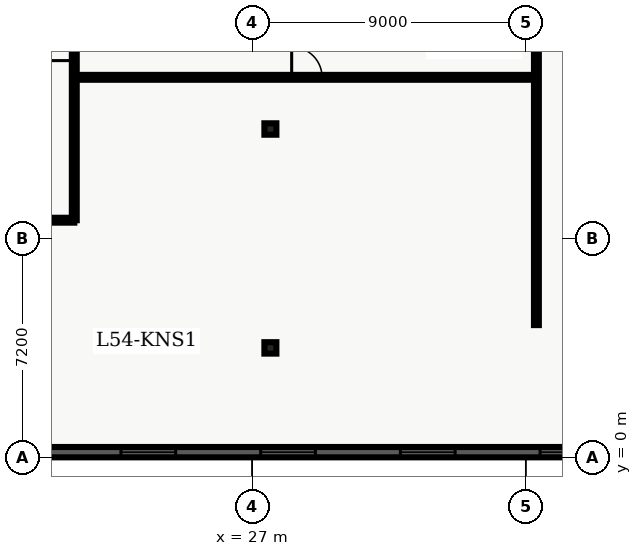
"""IFC4 building model, lengths in metres.
Left out: names, types, materials, properties, quantities, classifications, styles, units other than length and angle.
Written with IfcOpenShell. Run it as: python <this file> out.ifc"""

import sys

from ifc_helpers import new_model, entity, si_unit, converted_unit, direction, frame, origin_with_axes, origin_2d_with_axis, place, context, subcontext, project, spatial, polyline, rectangle, i_section, outline, extrude, element, fill, save


model = new_model("IFC4")
c1 = context("Model", 3, precision=1e-05, world=origin_with_axes(), true_north=direction((0.0, 1.0)))
c2 = subcontext(c1, "Body", "Model", "MODEL_VIEW")
j1 = project(units=[si_unit("LENGTHUNIT", "METRE"), converted_unit("PLANEANGLEUNIT", "DEGREE", entity("IfcPlaneAngleMeasure", 0.017), si_unit("PLANEANGLEUNIT", "RADIAN"), dimensions=[0, 0, 0, 0, 0, 0, 0])], contexts=[c1])
p1 = place(None, origin_with_axes())
s1 = spatial("IfcSite", under=j1, at=p1, CompositionType="ELEMENT")
p2 = place(p1, origin_with_axes())
s2 = spatial("IfcBuilding", under=s1, at=p2, CompositionType="ELEMENT")
p3 = place(p2, frame((0.0, 0.0, 219.9), z_axis=(0.0, 0.0, 1.0), x_axis=(1.0, 0.0, 0.0)))
s3 = spatial("IfcBuildingStorey", under=s2, at=p3, CompositionType="ELEMENT", Elevation=219.9)
for number, where, z_axis, x_axis in (
    (1, (27.6, 3.6, 0.0), (0.0, 0.0, 1.0), (1.0, 0.0, 0.0)),
    (2, (27.6, 10.8, 0.0), (0.0, 0.0, 1.0), (1.0, 0.0, 0.0)),
):
    element("IfcColumn", number, at=place(p3, frame(where, z_axis=z_axis, x_axis=x_axis)), inside=s3, PredefinedType="COLUMN", context=c2, shape_type="SweptSolid", body=[
        extrude(i_section(OverallWidth=0.394, OverallDepth=0.375, WebThickness=0.017, FlangeThickness=0.028, FilletRadius=0.02, at=origin_2d_with_axis()), origin_with_axes(), (0.0, 0.0, 1.0), 4.8),
    ])
p4 = place(p3, frame((7.1, 7.8, 0.0), z_axis=(0.0, 0.0, 1.0), x_axis=(1.0, 0.0, 0.0)))
e3 = element("IfcWall", 3, at=p4, inside=s3, PredefinedType="PARTITIONING", context=c2, shape_type="SweptSolid", body=[
    extrude(outline(polyline([(0.0, -0.08), (14.05, -0.08), (14.05, 0.08), (0.0, 0.08), (0.0, -0.08)])), origin_with_axes(), (0.0, 0.0, 1.0), 3.2),
])
p5 = place(p4, frame((3.051, 0.0, 0.0), z_axis=(0.0, 0.0, 1.0), x_axis=(1.0, 0.0, 0.0)))
e4 = element("IfcOpeningElement", 4, at=p5, cuts=e3, PredefinedType="OPENING", context=c2, shape_type="SweptSolid", body=[
    extrude(rectangle(XDim=1.0, YDim=0.18, at=origin_2d_with_axis()), origin_with_axes(), (0.0, 0.0, 1.0), 2.15),
])
p6 = place(p4, frame((10.056, 0.0, 0.0), z_axis=(0.0, 0.0, 1.0), x_axis=(1.0, 0.0, 0.0)))
e5 = element("IfcOpeningElement", 5, at=p6, cuts=e3, PredefinedType="OPENING", context=c2, shape_type="SweptSolid", body=[
    extrude(rectangle(XDim=1.0, YDim=0.18, at=origin_2d_with_axis()), origin_with_axes(), (0.0, 0.0, 1.0), 2.15),
])
p7 = place(p3, frame((21.15, 7.8, 0.0), z_axis=(0.0, 0.0, 1.0), x_axis=(0.0, 1.0, 0.0)))
e6 = element("IfcWall", 6, at=p7, inside=s3, PredefinedType="PARTITIONING", context=c2, shape_type="SweptSolid", body=[
    extrude(outline(polyline([(0.0, -0.08), (32.7, -0.08), (32.7, 0.08), (0.0, 0.08), (0.0, -0.08)])), origin_with_axes(), (0.0, 0.0, 1.0), 3.2),
])
p8 = place(p7, frame((18.032, 0.0, 0.0), z_axis=(0.0, 0.0, 1.0), x_axis=(1.0, 0.0, 0.0)))
e7 = element("IfcOpeningElement", 7, at=p8, cuts=e6, PredefinedType="OPENING", context=c2, shape_type="SweptSolid", body=[
    extrude(rectangle(XDim=1.0, YDim=0.18, at=origin_2d_with_axis()), origin_with_axes(), (0.0, 0.0, 1.0), 2.15),
])
p9 = place(p7, frame((27.352, 0.0, 0.0), z_axis=(0.0, 0.0, 1.0), x_axis=(1.0, 0.0, 0.0)))
e8 = element("IfcOpeningElement", 8, at=p9, cuts=e6, PredefinedType="OPENING", context=c2, shape_type="SweptSolid", body=[
    extrude(rectangle(XDim=1.0, YDim=0.18, at=origin_2d_with_axis()), origin_with_axes(), (0.0, 0.0, 1.0), 2.15),
])
p10 = place(p7, frame((5.775, 0.0, 0.0), z_axis=(0.0, 0.0, 1.0), x_axis=(1.0, 0.0, 0.0)))
e9 = element("IfcOpeningElement", 9, at=p10, cuts=e6, PredefinedType="OPENING", context=c2, shape_type="SweptSolid", body=[
    extrude(rectangle(XDim=1.05, YDim=0.18, at=origin_2d_with_axis()), origin_with_axes(), (0.0, 0.0, 1.0), 2.15),
])
p11 = place(p3, frame((21.15, 12.5, 0.0), z_axis=(0.0, 0.0, 1.0), x_axis=(1.0, 0.0, 0.0)))
e10 = element("IfcWall", 10, at=p11, inside=s3, PredefinedType="PARTITIONING", context=c2, shape_type="SweptSolid", body=[
    extrude(outline(polyline([(0.0, -0.08), (15.2, -0.08), (15.2, 0.08), (0.0, 0.08), (0.0, -0.08)])), origin_with_axes(), (0.0, 0.0, 1.0), 3.2),
])
p12 = place(p11, frame((7.65, 0.0, 0.0), z_axis=(0.0, 0.0, 1.0), x_axis=(1.0, 0.0, 0.0)))
e11 = element("IfcOpeningElement", 11, at=p12, cuts=e10, PredefinedType="OPENING", context=c2, shape_type="SweptSolid", body=[
    extrude(rectangle(XDim=1.0, YDim=0.18, at=origin_2d_with_axis()), origin_with_axes(), (0.0, 0.0, 1.0), 2.15),
])
p13 = place(p3, frame((36.35, 4.35, 0.0), z_axis=(0.0, 0.0, 1.0), x_axis=(0.0, 1.0, 0.0)))
e12 = element("IfcWall", 12, at=p13, inside=s3, PredefinedType="PARTITIONING", context=c2, shape_type="SweptSolid", body=[
    extrude(outline(polyline([(0.0, -0.08), (16.95, -0.08), (16.95, 0.08), (0.0, 0.08), (0.0, -0.08)])), origin_with_axes(), (0.0, 0.0, 1.0), 3.2),
])
p14 = place(p3, frame((49.46, 0.17, 0.0), z_axis=(0.0, 0.0, 1.0), x_axis=(-1.0, 0.0, 0.0)))
e13 = element("IfcWall", 13, at=p14, inside=s3, PredefinedType="SOLIDWALL", context=c2, shape_type="SweptSolid", body=[
    extrude(outline(polyline([(0.0, -0.17), (42.56, -0.17), (42.56, 0.17), (0.0, 0.17), (0.0, -0.17)])), origin_with_axes(), (0.0, 0.0, 1.0), 4.56),
])
p15 = place(p14, frame((2.898, 0.0, 0.45), z_axis=(0.0, 0.0, 1.0), x_axis=(1.0, 0.0, 0.0)))
e14 = element("IfcOpeningElement", 14, at=p15, cuts=e13, PredefinedType="OPENING", context=c2, shape_type="SweptSolid", body=[
    extrude(rectangle(XDim=1.8, YDim=0.36, at=origin_2d_with_axis()), origin_with_axes(), (0.0, 0.0, 1.0), 2.1),
])
p16 = place(p14, frame((7.493, 0.0, 0.45), z_axis=(0.0, 0.0, 1.0), x_axis=(1.0, 0.0, 0.0)))
e15 = element("IfcOpeningElement", 15, at=p16, cuts=e13, PredefinedType="OPENING", context=c2, shape_type="SweptSolid", body=[
    extrude(rectangle(XDim=1.8, YDim=0.36, at=origin_2d_with_axis()), origin_with_axes(), (0.0, 0.0, 1.0), 2.1),
])
p17 = place(p14, frame((12.089, 0.0, 0.45), z_axis=(0.0, 0.0, 1.0), x_axis=(1.0, 0.0, 0.0)))
e16 = element("IfcOpeningElement", 16, at=p17, cuts=e13, PredefinedType="OPENING", context=c2, shape_type="SweptSolid", body=[
    extrude(rectangle(XDim=1.8, YDim=0.36, at=origin_2d_with_axis()), origin_with_axes(), (0.0, 0.0, 1.0), 2.1),
])
p18 = place(p14, frame((16.684, 0.0, 0.45), z_axis=(0.0, 0.0, 1.0), x_axis=(1.0, 0.0, 0.0)))
e17 = element("IfcOpeningElement", 17, at=p18, cuts=e13, PredefinedType="OPENING", context=c2, shape_type="SweptSolid", body=[
    extrude(rectangle(XDim=1.8, YDim=0.36, at=origin_2d_with_axis()), origin_with_axes(), (0.0, 0.0, 1.0), 2.1),
])
p19 = place(p14, frame((21.28, 0.0, 0.45), z_axis=(0.0, 0.0, 1.0), x_axis=(1.0, 0.0, 0.0)))
e18 = element("IfcOpeningElement", 18, at=p19, cuts=e13, PredefinedType="OPENING", context=c2, shape_type="SweptSolid", body=[
    extrude(rectangle(XDim=1.8, YDim=0.36, at=origin_2d_with_axis()), origin_with_axes(), (0.0, 0.0, 1.0), 2.1),
])
p20 = place(p14, frame((25.876, 0.0, 0.45), z_axis=(0.0, 0.0, 1.0), x_axis=(1.0, 0.0, 0.0)))
e19 = element("IfcOpeningElement", 19, at=p20, cuts=e13, PredefinedType="OPENING", context=c2, shape_type="SweptSolid", body=[
    extrude(rectangle(XDim=1.8, YDim=0.36, at=origin_2d_with_axis()), origin_with_axes(), (0.0, 0.0, 1.0), 2.1),
])
p21 = place(p14, frame((30.471, 0.0, 0.45), z_axis=(0.0, 0.0, 1.0), x_axis=(1.0, 0.0, 0.0)))
e20 = element("IfcOpeningElement", 20, at=p21, cuts=e13, PredefinedType="OPENING", context=c2, shape_type="SweptSolid", body=[
    extrude(rectangle(XDim=1.8, YDim=0.36, at=origin_2d_with_axis()), origin_with_axes(), (0.0, 0.0, 1.0), 2.1),
])
p22 = place(p14, frame((34.617, 0.0, 0.45), z_axis=(0.0, 0.0, 1.0), x_axis=(1.0, 0.0, 0.0)))
e21 = element("IfcOpeningElement", 21, at=p22, cuts=e13, PredefinedType="OPENING", context=c2, shape_type="SweptSolid", body=[
    extrude(rectangle(XDim=1.8, YDim=0.36, at=origin_2d_with_axis()), origin_with_axes(), (0.0, 0.0, 1.0), 2.1),
])
p23 = place(p14, frame((39.662, 0.0, 0.45), z_axis=(0.0, 0.0, 1.0), x_axis=(1.0, 0.0, 0.0)))
e22 = element("IfcOpeningElement", 22, at=p23, cuts=e13, PredefinedType="OPENING", context=c2, shape_type="SweptSolid", body=[
    extrude(rectangle(XDim=1.8, YDim=0.36, at=origin_2d_with_axis()), origin_with_axes(), (0.0, 0.0, 1.0), 2.1),
])
p24 = place(p7, frame((5.775, 0.0, 0.0), z_axis=(0.0, 0.0, 1.0), x_axis=(1.0, 0.0, 0.0)))
e23 = element("IfcDoor", 23, at=p24, inside=s3, OperationType="SINGLE_SWING_LEFT", PredefinedType="DOOR", context=c2, shape_type="SweptSolid", body=[
    extrude(rectangle(XDim=1.05, YDim=0.09, at=origin_2d_with_axis()), origin_with_axes(), (0.0, 0.0, 1.0), 2.15),
])
fill(e9, e23)
p25 = place(p11, frame((7.65, 0.0, 0.0), z_axis=(0.0, 0.0, 1.0), x_axis=(1.0, 0.0, 0.0)))
e24 = element("IfcDoor", 24, at=p25, inside=s3, OperationType="SINGLE_SWING_LEFT", PredefinedType="DOOR", context=c2, shape_type="SweptSolid", body=[
    extrude(rectangle(XDim=1.0, YDim=0.09, at=origin_2d_with_axis()), origin_with_axes(), (0.0, 0.0, 1.0), 2.15),
])
fill(e11, e24)
p26 = place(p14, frame((12.089, 0.0, 0.45), z_axis=(0.0, 0.0, 1.0), x_axis=(1.0, 0.0, 0.0)))
e25 = element("IfcWindow", 25, at=p26, inside=s3, PredefinedType="WINDOW", context=c2, shape_type="SweptSolid", body=[
    extrude(rectangle(XDim=1.8, YDim=0.09, at=origin_2d_with_axis()), origin_with_axes(), (0.0, 0.0, 1.0), 2.1),
])
fill(e16, e25)
p27 = place(p14, frame((16.684, 0.0, 0.45), z_axis=(0.0, 0.0, 1.0), x_axis=(1.0, 0.0, 0.0)))
e26 = element("IfcWindow", 26, at=p27, inside=s3, PredefinedType="WINDOW", context=c2, shape_type="SweptSolid", body=[
    extrude(rectangle(XDim=1.8, YDim=0.09, at=origin_2d_with_axis()), origin_with_axes(), (0.0, 0.0, 1.0), 2.1),
])
fill(e17, e26)
p28 = place(p14, frame((21.28, 0.0, 0.45), z_axis=(0.0, 0.0, 1.0), x_axis=(1.0, 0.0, 0.0)))
e27 = element("IfcWindow", 27, at=p28, inside=s3, PredefinedType="WINDOW", context=c2, shape_type="SweptSolid", body=[
    extrude(rectangle(XDim=1.8, YDim=0.09, at=origin_2d_with_axis()), origin_with_axes(), (0.0, 0.0, 1.0), 2.1),
])
fill(e18, e27)
p29 = place(p14, frame((25.876, 0.0, 0.45), z_axis=(0.0, 0.0, 1.0), x_axis=(1.0, 0.0, 0.0)))
e28 = element("IfcWindow", 28, at=p29, inside=s3, PredefinedType="WINDOW", context=c2, shape_type="SweptSolid", body=[
    extrude(rectangle(XDim=1.8, YDim=0.09, at=origin_2d_with_axis()), origin_with_axes(), (0.0, 0.0, 1.0), 2.1),
])
fill(e19, e28)
save(model, sys.argv[1])
